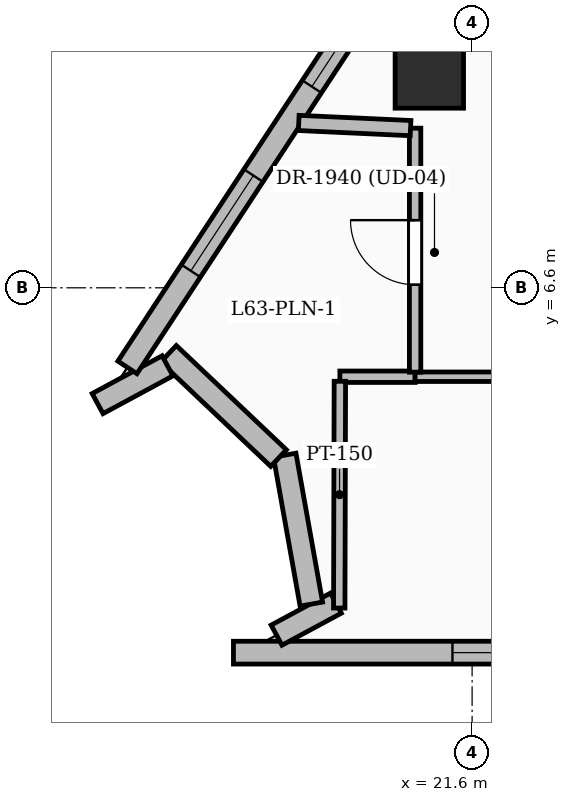
"""IFC4 building model, lengths in metres.
Left out: names, types, materials, properties, quantities, classifications, styles, units other than length and angle.
Written with IfcOpenShell. Run it as: python <this file> out.ifc"""

import sys

from ifc_helpers import new_model, si_unit, direction, frame, frame_2d, origin, origin_2d, place, context, subcontext, project, spatial, rectangle, extrude, element, fill, save


model = new_model("IFC4")
c1 = context("Model", 3, precision=1e-05, world=origin(), true_north=direction((0.0, 1.0)))
c2 = subcontext(c1, "Body", "Model", "MODEL_VIEW")
j1 = project(units=[si_unit("LENGTHUNIT", "METRE"), si_unit("PLANEANGLEUNIT", "RADIAN")], contexts=[c1])
p1 = place(None, origin())
s1 = spatial("IfcSite", under=j1, at=p1, CompositionType="ELEMENT")
p2 = place(p1, origin())
s2 = spatial("IfcBuilding", under=s1, at=p2, CompositionType="ELEMENT")
p3 = place(p2, frame((0.0, 0.0, 244.5)))
s3 = spatial("IfcBuildingStorey", under=s2, at=p3, CompositionType="ELEMENT", Elevation=244.5)
p4 = place(p3, frame((21.037, 9.413, 0.0), z_axis=(0.0, 0.0, 1.0), x_axis=(1.0, 0.0, 0.0)))
e1 = element("IfcColumn", 1, at=p4, inside=s3, PredefinedType="COLUMN", context=c2, shape_type="SweptSolid", body=[
    extrude(rectangle(XDim=0.9, YDim=0.9, at=origin_2d()), origin(), (0.0, 0.0, 1.0), 3.75),
])
p5 = place(p3, frame((24.841, 1.8, 0.0), z_axis=(0.0, 0.0, 1.0), x_axis=(-1.0, 0.0, 0.0)))
e2 = element("IfcWall", 2, at=p5, inside=s3, PredefinedType="SOLIDWALL", context=c2, shape_type="SweptSolid", body=[
    extrude(rectangle(XDim=6.381, YDim=0.3, at=frame_2d((3.191, 0.0))), origin(), (0.0, 0.0, 1.0), 3.5),
])
p6 = place(p5, frame((2.3, 0.0, 0.8)))
e3 = element("IfcOpeningElement", 3, at=p6, cuts=e2, PredefinedType="OPENING", context=c2, shape_type="SweptSolid", body=[
    extrude(rectangle(XDim=1.2, YDim=1.8, at=frame_2d((0.6, 0.9))), frame((0.0, 0.16, 0.0), z_axis=(0.0, -1.0, 0.0), x_axis=(1.0, 0.0, 0.0)), (0.0, 0.0, 1.0), 0.32),
])
p7 = place(p3, frame((19.027, 2.03, 0.0), z_axis=(0.0, 0.0, 1.0), x_axis=(0.880197238834, 0.474608070674, 0.0)))
e4 = element("IfcWall", 4, at=p7, inside=s3, PredefinedType="SOLIDWALL", context=c2, shape_type="SweptSolid", body=[
    extrude(rectangle(XDim=0.888, YDim=0.3, at=frame_2d((0.444, 0.0))), origin(), (0.0, 0.0, 1.0), 3.5),
])
p8 = place(p3, frame((19.485, 2.439, 0.0), z_axis=(0.0, 0.0, 1.0), x_axis=(-0.175926512458, 0.984403302623, 0.0)))
e5 = element("IfcWall", 5, at=p8, inside=s3, PredefinedType="SOLIDWALL", context=c2, shape_type="SweptSolid", body=[
    extrude(rectangle(XDim=1.99, YDim=0.3, at=frame_2d((0.995, 0.0))), origin(), (0.0, 0.0, 1.0), 3.5),
])
p9 = place(p3, frame((19.054, 4.36, 0.0), z_axis=(0.0, 0.0, 1.0), x_axis=(-0.726119894398, 0.68756810496, 0.0)))
e6 = element("IfcWall", 6, at=p9, inside=s3, PredefinedType="SOLIDWALL", context=c2, shape_type="SweptSolid", body=[
    extrude(rectangle(XDim=1.995, YDim=0.3, at=frame_2d((0.998, 0.0))), origin(), (0.0, 0.0, 1.0), 3.5),
])
p10 = place(p3, frame((17.593, 5.573, 0.0), z_axis=(0.0, 0.0, 1.0), x_axis=(-0.879825313212, -0.475297189378, 0.0)))
e7 = element("IfcWall", 7, at=p10, inside=s3, PredefinedType="SOLIDWALL", context=c2, shape_type="SweptSolid", body=[
    extrude(rectangle(XDim=1.045, YDim=0.3, at=frame_2d((0.523, 0.0))), origin(), (0.0, 0.0, 1.0), 3.5),
])
p11 = place(p3, frame((17.065, 5.552, 0.0), z_axis=(0.0, 0.0, 1.0), x_axis=(0.54904237545, 0.835794514196, 0.0)))
e8 = element("IfcWall", 8, at=p11, inside=s3, PredefinedType="SOLIDWALL", context=c2, shape_type="SweptSolid", body=[
    extrude(rectangle(XDim=6.328, YDim=0.3, at=frame_2d((3.164, 0.0))), origin(), (0.0, 0.0, 1.0), 3.5),
])
p12 = place(p11, frame((1.52, 0.0, 0.6)))
e9 = element("IfcOpeningElement", 9, at=p12, cuts=e8, PredefinedType="OPENING", context=c2, shape_type="SweptSolid", body=[
    extrude(rectangle(XDim=1.5, YDim=2.1, at=frame_2d((0.75, 1.05))), frame((0.0, 0.16, 0.0), z_axis=(0.0, -1.0, 0.0), x_axis=(1.0, 0.0, 0.0)), (0.0, 0.0, 1.0), 0.32),
])
p13 = place(p11, frame((4.42, 0.0, 0.8)))
e10 = element("IfcOpeningElement", 10, at=p13, cuts=e8, PredefinedType="OPENING", context=c2, shape_type="SweptSolid", body=[
    extrude(rectangle(XDim=1.2, YDim=1.8, at=frame_2d((0.6, 0.9))), frame((0.0, 0.16, 0.0), z_axis=(0.0, -1.0, 0.0), x_axis=(1.0, 0.0, 0.0)), (0.0, 0.0, 1.0), 0.32),
])
p14 = place(p3, frame((20.85, 5.43, 0.0), z_axis=(0.0, 0.0, 1.0), x_axis=(-1.0, 0.0, 0.0)))
e11 = element("IfcWall", 11, at=p14, inside=s3, PredefinedType="PARTITIONING", context=c2, shape_type="SweptSolid", body=[
    extrude(rectangle(XDim=0.99, YDim=0.15, at=frame_2d((0.495, 0.0))), origin(), (0.0, 0.0, 1.0), 3.5),
])
p15 = place(p3, frame((19.86, 5.37, 0.0), z_axis=(0.0, 0.0, 1.0), x_axis=(-0.002700702157, -0.999996353097, 0.0)))
e12 = element("IfcWall", 12, at=p15, inside=s3, PredefinedType="PARTITIONING", context=c2, shape_type="SweptSolid", body=[
    extrude(rectangle(XDim=2.983, YDim=0.15, at=frame_2d((1.492, 0.0))), origin(), (0.0, 0.0, 1.0), 3.5),
])
p16 = place(p3, frame((22.58, 5.43, 0.0), z_axis=(0.0, 0.0, 1.0), x_axis=(-1.0, 0.0, 0.0)))
e13 = element("IfcWall", 13, at=p16, inside=s3, PredefinedType="PARTITIONING", context=c2, shape_type="SweptSolid", body=[
    extrude(rectangle(XDim=1.73, YDim=0.125, at=frame_2d((0.865, 0.0))), origin(), (0.0, 0.0, 1.0), 3.5),
])
p17 = place(p3, frame((20.85, 5.49, 0.0), z_axis=(0.0, 0.0, 1.0), x_axis=(0.0, 1.0, 0.0)))
e14 = element("IfcWall", 14, at=p17, inside=s3, PredefinedType="PARTITIONING", context=c2, shape_type="SweptSolid", body=[
    extrude(rectangle(XDim=3.21, YDim=0.15, at=frame_2d((1.605, 0.0))), origin(), (0.0, 0.0, 1.0), 3.5),
])
p18 = place(p17, frame((1.15, 0.0, 0.0)))
e15 = element("IfcOpeningElement", 15, at=p18, cuts=e14, PredefinedType="OPENING", context=c2, shape_type="SweptSolid", body=[
    extrude(rectangle(XDim=0.85, YDim=2.1, at=frame_2d((0.425, 1.05))), frame((0.0, 0.085, 0.0), z_axis=(0.0, -1.0, 0.0), x_axis=(1.0, 0.0, 0.0)), (0.0, 0.0, 1.0), 0.17),
])
p19 = place(p3, frame((20.79, 8.701, 0.0), z_axis=(0.0, 0.0, 1.0), x_axis=(-0.99892954963, 0.046257484539, 0.0)))
e16 = element("IfcWall", 16, at=p19, inside=s3, PredefinedType="PARTITIONING", context=c2, shape_type="SweptSolid", body=[
    extrude(rectangle(XDim=1.472, YDim=0.2, at=frame_2d((0.736, 0.0))), origin(), (0.0, 0.0, 1.0), 3.5),
])
p20 = place(p6, origin())
e17 = element("IfcWindow", 17, at=p20, inside=s3, PartitioningType="SINGLE_PANEL", PredefinedType="WINDOW", context=c2, shape_type="SweptSolid", body=[
    extrude(rectangle(XDim=1.2, YDim=1.8, at=frame_2d((0.6, 0.9))), frame((0.0, 0.03, 0.0), z_axis=(0.0, -1.0, 0.0), x_axis=(1.0, 0.0, 0.0)), (0.0, 0.0, 1.0), 0.06),
])
fill(e3, e17)
p21 = place(p12, origin())
e18 = element("IfcWindow", 18, at=p21, inside=s3, PartitioningType="SINGLE_PANEL", PredefinedType="WINDOW", context=c2, shape_type="SweptSolid", body=[
    extrude(rectangle(XDim=1.5, YDim=2.1, at=frame_2d((0.75, 1.05))), frame((0.0, 0.03, 0.0), z_axis=(0.0, -1.0, 0.0), x_axis=(1.0, 0.0, 0.0)), (0.0, 0.0, 1.0), 0.06),
])
fill(e9, e18)
p22 = place(p13, origin())
e19 = element("IfcWindow", 19, at=p22, inside=s3, PartitioningType="SINGLE_PANEL", PredefinedType="WINDOW", context=c2, shape_type="SweptSolid", body=[
    extrude(rectangle(XDim=1.2, YDim=1.8, at=frame_2d((0.6, 0.9))), frame((0.0, 0.03, 0.0), z_axis=(0.0, -1.0, 0.0), x_axis=(1.0, 0.0, 0.0)), (0.0, 0.0, 1.0), 0.06),
])
fill(e10, e19)
p23 = place(p18, origin())
e20 = element("IfcDoor", 20, at=p23, inside=s3, OperationType="SINGLE_SWING_RIGHT", PredefinedType="DOOR", context=c2, shape_type="SweptSolid", body=[
    extrude(rectangle(XDim=0.85, YDim=2.1, at=frame_2d((0.425, 1.05))), frame((0.0, 0.025, 0.0), z_axis=(0.0, -1.0, 0.0), x_axis=(1.0, 0.0, 0.0)), (0.0, 0.0, 1.0), 0.05),
])
fill(e15, e20)
save(model, sys.argv[1])
